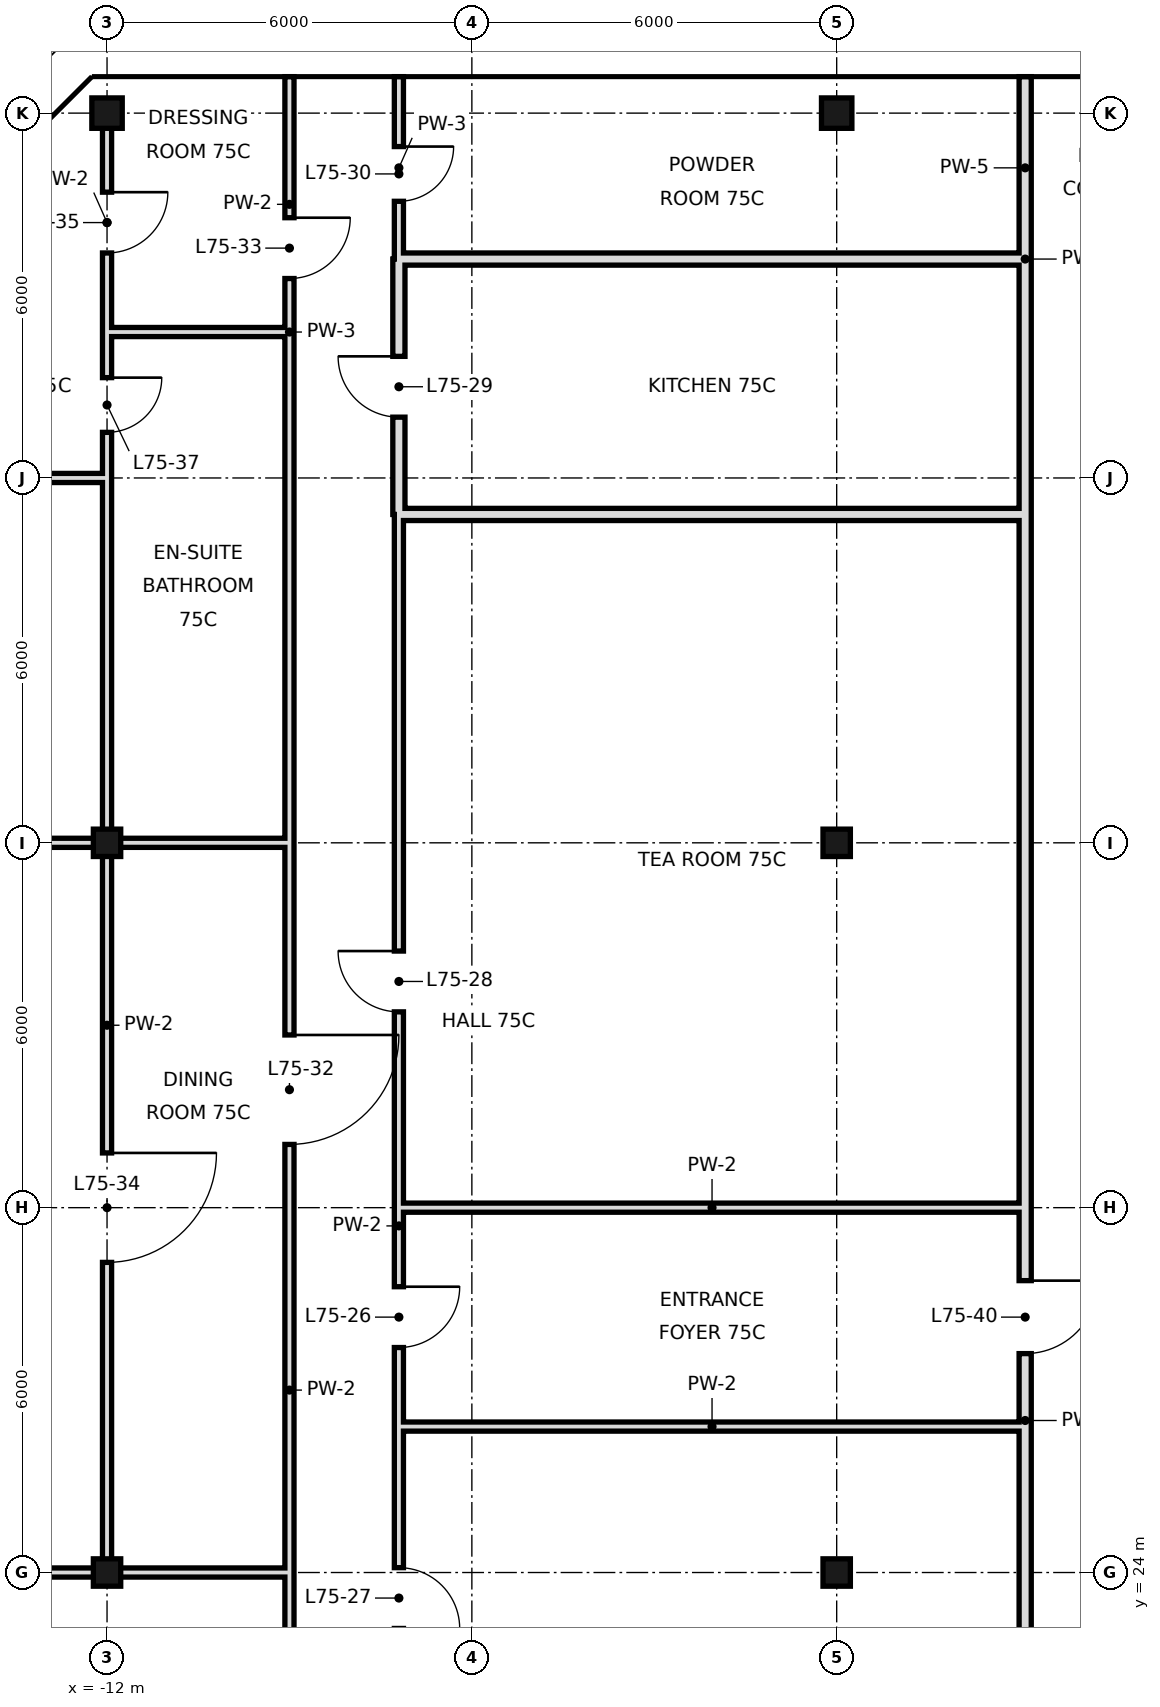
"""IFC4 building model, lengths in metres.
Left out: names, types, materials, properties, quantities, classifications, styles, units other than length and angle.
Written with IfcOpenShell. Run it as: python <this file> out.ifc"""

import sys

from ifc_helpers import new_model, si_unit, direction, frame, frame_2d, origin, origin_2d, place, context, subcontext, project, spatial, rectangle, hollow_rectangle, extrude, element, fill, save


model = new_model("IFC4")
c1 = context("Model", 3, precision=1e-05, world=origin(), true_north=direction((0.0, 1.0)))
c2 = subcontext(c1, "Body", "Model", "MODEL_VIEW")
j1 = project(units=[si_unit("LENGTHUNIT", "METRE"), si_unit("PLANEANGLEUNIT", "RADIAN")], contexts=[c1])
p1 = place(None, origin())
s1 = spatial("IfcSite", under=j1, at=p1, CompositionType="ELEMENT")
p2 = place(p1, origin())
s2 = spatial("IfcBuilding", under=s1, at=p2, CompositionType="ELEMENT")
p3 = place(p2, frame((0.0, 0.0, 316.0)))
s3 = spatial("IfcBuildingStorey", under=s2, at=p3, CompositionType="ELEMENT", Elevation=316.0)
for number, where, z_axis, x_axis in (
    (1, (-12.0, 24.0, 0.0), (0.0, 0.0, 1.0), (1.0, 0.0, 0.0)),
    (2, (-12.0, 36.0, 0.0), (0.0, 0.0, 1.0), (1.0, 0.0, 0.0)),
):
    element("IfcColumn", number, at=place(p3, frame(where, z_axis=z_axis, x_axis=x_axis)), inside=s3, PredefinedType="COLUMN", context=c2, shape_type="SweptSolid", body=[
        extrude(hollow_rectangle(XDim=0.45, YDim=0.45, WallThickness=0.022, at=origin_2d()), origin(), (0.0, 0.0, 1.0), 3.6),
    ])
p4 = place(p3, frame((-12.0, 48.0, 0.0), z_axis=(0.0, 0.0, 1.0), x_axis=(1.0, 0.0, 0.0)))
e3 = element("IfcColumn", 3, at=p4, inside=s3, PredefinedType="COLUMN", context=c2, shape_type="SweptSolid", body=[
    extrude(hollow_rectangle(XDim=0.5, YDim=0.5, WallThickness=0.025, at=origin_2d()), origin(), (0.0, 0.0, 1.0), 3.6),
])
for number, where, z_axis, x_axis in (
    (4, (0.0, 24.0, 0.0), (0.0, 0.0, 1.0), (1.0, 0.0, 0.0)),
    (5, (0.0, 36.0, 0.0), (0.0, 0.0, 1.0), (1.0, 0.0, 0.0)),
):
    element("IfcColumn", number, at=place(p3, frame(where, z_axis=z_axis, x_axis=x_axis)), inside=s3, PredefinedType="COLUMN", context=c2, shape_type="SweptSolid", body=[
        extrude(hollow_rectangle(XDim=0.45, YDim=0.45, WallThickness=0.022, at=origin_2d()), origin(), (0.0, 0.0, 1.0), 3.6),
    ])
p5 = place(p3, frame((0.0, 48.0, 0.0), z_axis=(0.0, 0.0, 1.0), x_axis=(1.0, 0.0, 0.0)))
e6 = element("IfcColumn", 6, at=p5, inside=s3, PredefinedType="COLUMN", context=c2, shape_type="SweptSolid", body=[
    extrude(hollow_rectangle(XDim=0.5, YDim=0.5, WallThickness=0.025, at=origin_2d()), origin(), (0.0, 0.0, 1.0), 3.6),
])
p6 = place(p3, frame((-12.0, 24.0, 0.0), z_axis=(0.0, 0.0, 1.0), x_axis=(0.0, 1.0, 0.0)))
e7 = element("IfcWall", 7, at=p6, inside=s3, PredefinedType="PARTITIONING", context=c2, shape_type="SweptSolid", body=[
    extrude(rectangle(XDim=12.0, YDim=0.15, at=frame_2d((6.0, 0.0))), origin(), (0.0, 0.0, 1.0), 2.72),
])
p7 = place(p6, frame((5.1, 0.0, 0.0)))
e8 = element("IfcOpeningElement", 8, at=p7, cuts=e7, PredefinedType="OPENING", context=c2, shape_type="SweptSolid", body=[
    extrude(rectangle(XDim=1.8, YDim=2.4, at=frame_2d((0.9, 1.2))), frame((0.0, 0.085, 0.0), z_axis=(0.0, -1.0, 0.0), x_axis=(1.0, 0.0, 0.0)), (0.0, 0.0, 1.0), 0.17),
])
p8 = place(p3, frame((-12.0, 44.4, 0.0), z_axis=(0.0, 0.0, 1.0), x_axis=(0.0, 1.0, 0.0)))
e9 = element("IfcWall", 9, at=p8, inside=s3, PredefinedType="PARTITIONING", context=c2, shape_type="SweptSolid", body=[
    extrude(rectangle(XDim=3.6, YDim=0.15, at=frame_2d((1.8, 0.0))), origin(), (0.0, 0.0, 1.0), 2.72),
])
p9 = place(p8, frame((1.3, 0.0, 0.0)))
e10 = element("IfcOpeningElement", 10, at=p9, cuts=e9, PredefinedType="OPENING", context=c2, shape_type="SweptSolid", body=[
    extrude(rectangle(XDim=1.0, YDim=2.4, at=frame_2d((0.5, 1.2))), frame((0.0, 0.085, 0.0), z_axis=(0.0, -1.0, 0.0), x_axis=(1.0, 0.0, 0.0)), (0.0, 0.0, 1.0), 0.17),
])
p10 = place(p3, frame((-12.0, 36.0, 0.0), z_axis=(0.0, 0.0, 1.0), x_axis=(0.0, 1.0, 0.0)))
e11 = element("IfcWall", 11, at=p10, inside=s3, PredefinedType="PARTITIONING", context=c2, shape_type="SweptSolid", body=[
    extrude(rectangle(XDim=8.4, YDim=0.15, at=frame_2d((4.2, 0.0))), origin(), (0.0, 0.0, 1.0), 2.72),
])
p11 = place(p10, frame((6.75, 0.0, 0.0)))
e12 = element("IfcOpeningElement", 12, at=p11, cuts=e11, PredefinedType="OPENING", context=c2, shape_type="SweptSolid", body=[
    extrude(rectangle(XDim=0.9, YDim=2.4, at=frame_2d((0.45, 1.2))), frame((0.0, 0.085, 0.0), z_axis=(0.0, -1.0, 0.0), x_axis=(1.0, 0.0, 0.0)), (0.0, 0.0, 1.0), 0.17),
])
p12 = place(p3, frame((-7.2, 41.4, 0.0), z_axis=(0.0, 0.0, 1.0), x_axis=(0.0, 1.0, 0.0)))
e13 = element("IfcWall", 13, at=p12, inside=s3, PredefinedType="SOLIDWALL", context=c2, shape_type="SweptSolid", body=[
    extrude(rectangle(XDim=4.2, YDim=0.2, at=frame_2d((2.1, 0.0))), origin(), (0.0, 0.0, 1.0), 2.72),
])
p13 = place(p12, frame((1.6, 0.0, 0.0)))
e14 = element("IfcOpeningElement", 14, at=p13, cuts=e13, PredefinedType="OPENING", context=c2, shape_type="SweptSolid", body=[
    extrude(rectangle(XDim=1.0, YDim=2.4, at=frame_2d((0.5, 1.2))), frame((0.0, 0.11, 0.0), z_axis=(0.0, -1.0, 0.0), x_axis=(1.0, 0.0, 0.0)), (0.0, 0.0, 1.0), 0.22),
])
p14 = place(p3, frame((-7.2, 18.0, 0.0), z_axis=(0.0, 0.0, 1.0), x_axis=(0.0, 1.0, 0.0)))
e15 = element("IfcWall", 15, at=p14, inside=s3, PredefinedType="PARTITIONING", context=c2, shape_type="SweptSolid", body=[
    extrude(rectangle(XDim=23.4, YDim=0.15, at=frame_2d((11.7, 0.0))), origin(), (0.0, 0.0, 1.0), 3.42),
])
p15 = place(p14, frame((9.7, 0.0, 0.0)))
e16 = element("IfcOpeningElement", 16, at=p15, cuts=e15, PredefinedType="OPENING", context=c2, shape_type="SweptSolid", body=[
    extrude(rectangle(XDim=1.0, YDim=2.4, at=frame_2d((0.5, 1.2))), frame((0.0, 0.085, 0.0), z_axis=(0.0, -1.0, 0.0), x_axis=(1.0, 0.0, 0.0)), (0.0, 0.0, 1.0), 0.17),
])
p16 = place(p14, frame((5.08, 0.0, 0.0)))
e17 = element("IfcOpeningElement", 17, at=p16, cuts=e15, PredefinedType="OPENING", context=c2, shape_type="SweptSolid", body=[
    extrude(rectangle(XDim=1.0, YDim=2.4, at=frame_2d((0.5, 1.2))), frame((0.0, 0.085, 0.0), z_axis=(0.0, -1.0, 0.0), x_axis=(1.0, 0.0, 0.0)), (0.0, 0.0, 1.0), 0.17),
])
p17 = place(p14, frame((15.22, 0.0, 0.0)))
e18 = element("IfcOpeningElement", 18, at=p17, cuts=e15, PredefinedType="OPENING", context=c2, shape_type="SweptSolid", body=[
    extrude(rectangle(XDim=1.0, YDim=2.4, at=frame_2d((0.5, 1.2))), frame((0.0, 0.085, 0.0), z_axis=(0.0, -1.0, 0.0), x_axis=(1.0, 0.0, 0.0)), (0.0, 0.0, 1.0), 0.17),
])
p18 = place(p3, frame((-7.2, 45.6, 0.0), z_axis=(0.0, 0.0, 1.0), x_axis=(0.0, 1.0, 0.0)))
e19 = element("IfcWall", 19, at=p18, inside=s3, PredefinedType="PARTITIONING", context=c2, shape_type="SweptSolid", body=[
    extrude(rectangle(XDim=3.0, YDim=0.15, at=frame_2d((1.5, 0.0))), origin(), (0.0, 0.0, 1.0), 3.42),
])
p19 = place(p18, frame((0.95, 0.0, 0.0)))
e20 = element("IfcOpeningElement", 20, at=p19, cuts=e19, PredefinedType="OPENING", context=c2, shape_type="SweptSolid", body=[
    extrude(rectangle(XDim=0.9, YDim=2.4, at=frame_2d((0.45, 1.2))), frame((0.0, 0.085, 0.0), z_axis=(0.0, -1.0, 0.0), x_axis=(1.0, 0.0, 0.0)), (0.0, 0.0, 1.0), 0.17),
])
p20 = place(p3, frame((-9.0, 18.0, 0.0), z_axis=(0.0, 0.0, 1.0), x_axis=(0.0, 1.0, 0.0)))
e21 = element("IfcWall", 21, at=p20, inside=s3, PredefinedType="PARTITIONING", context=c2, shape_type="SweptSolid", body=[
    extrude(rectangle(XDim=18.0, YDim=0.15, at=frame_2d((9.0, 0.0))), origin(), (0.0, 0.0, 1.0), 3.42),
])
p21 = place(p20, frame((2.5, 0.0, 0.0)))
e22 = element("IfcOpeningElement", 22, at=p21, cuts=e21, PredefinedType="OPENING", context=c2, shape_type="SweptSolid", body=[
    extrude(rectangle(XDim=1.0, YDim=2.4, at=frame_2d((0.5, 1.2))), frame((0.0, 0.085, 0.0), z_axis=(0.0, -1.0, 0.0), x_axis=(1.0, 0.0, 0.0)), (0.0, 0.0, 1.0), 0.17),
])
p22 = place(p20, frame((13.04, 0.0, 0.0)))
e23 = element("IfcOpeningElement", 23, at=p22, cuts=e21, PredefinedType="OPENING", context=c2, shape_type="SweptSolid", body=[
    extrude(rectangle(XDim=1.8, YDim=2.4, at=frame_2d((0.9, 1.2))), frame((0.0, 0.085, 0.0), z_axis=(0.0, -1.0, 0.0), x_axis=(1.0, 0.0, 0.0)), (0.0, 0.0, 1.0), 0.17),
])
p23 = place(p3, frame((-9.0, 44.4, 0.0), z_axis=(0.0, 0.0, 1.0), x_axis=(0.0, 1.0, 0.0)))
e24 = element("IfcWall", 24, at=p23, inside=s3, PredefinedType="PARTITIONING", context=c2, shape_type="SweptSolid", body=[
    extrude(rectangle(XDim=4.2, YDim=0.15, at=frame_2d((2.1, 0.0))), origin(), (0.0, 0.0, 1.0), 3.42),
])
p24 = place(p23, frame((0.88, 0.0, 0.0)))
e25 = element("IfcOpeningElement", 25, at=p24, cuts=e24, PredefinedType="OPENING", context=c2, shape_type="SweptSolid", body=[
    extrude(rectangle(XDim=1.0, YDim=2.4, at=frame_2d((0.5, 1.2))), frame((0.0, 0.085, 0.0), z_axis=(0.0, -1.0, 0.0), x_axis=(1.0, 0.0, 0.0)), (0.0, 0.0, 1.0), 0.17),
])
p25 = place(p3, frame((-9.0, 36.0, 0.0), z_axis=(0.0, 0.0, 1.0), x_axis=(0.0, 1.0, 0.0)))
e26 = element("IfcWall", 26, at=p25, inside=s3, PredefinedType="PARTITIONING", context=c2, shape_type="SweptSolid", body=[
    extrude(rectangle(XDim=8.4, YDim=0.15, at=frame_2d((4.2, 0.0))), origin(), (0.0, 0.0, 1.0), 3.42),
])
p26 = place(p3, frame((3.1, 18.7, 0.0), z_axis=(0.0, 0.0, 1.0), x_axis=(0.0, 1.0, 0.0)))
e27 = element("IfcWall", 27, at=p26, inside=s3, PredefinedType="SOLIDWALL", context=c2, shape_type="SweptSolid", body=[
    extrude(rectangle(XDim=22.7, YDim=0.2, at=frame_2d((11.35, 0.0))), origin(), (0.0, 0.0, 1.0), 2.97),
])
p27 = place(p26, frame((8.9, 0.0, 0.0)))
e28 = element("IfcOpeningElement", 28, at=p27, cuts=e27, PredefinedType="OPENING", context=c2, shape_type="SweptSolid", body=[
    extrude(rectangle(XDim=1.2, YDim=2.4, at=frame_2d((0.6, 1.2))), frame((0.0, 0.11, 0.0), z_axis=(0.0, -1.0, 0.0), x_axis=(1.0, 0.0, 0.0)), (0.0, 0.0, 1.0), 0.22),
])
p28 = place(p3, frame((3.1, 45.6, 0.0), z_axis=(0.0, 0.0, 1.0), x_axis=(0.0, 1.0, 0.0)))
e29 = element("IfcWall", 29, at=p28, inside=s3, PredefinedType="SOLIDWALL", context=c2, shape_type="SweptSolid", body=[
    extrude(rectangle(XDim=3.0, YDim=0.2, at=frame_2d((1.5, 0.0))), origin(), (0.0, 0.0, 1.0), 2.72),
])
p29 = place(p3, frame((3.1, 41.4, 0.0), z_axis=(0.0, 0.0, 1.0), x_axis=(0.0, 1.0, 0.0)))
e30 = element("IfcWall", 30, at=p29, inside=s3, PredefinedType="SOLIDWALL", context=c2, shape_type="SweptSolid", body=[
    extrude(rectangle(XDim=4.2, YDim=0.2, at=frame_2d((2.1, 0.0))), origin(), (0.0, 0.0, 1.0), 2.97),
])
p30 = place(p3, frame((-18.0, 24.0, 0.0), z_axis=(0.0, 0.0, 1.0), x_axis=(1.0, 0.0, 0.0)))
e31 = element("IfcWall", 31, at=p30, inside=s3, PredefinedType="PARTITIONING", context=c2, shape_type="SweptSolid", body=[
    extrude(rectangle(XDim=9.0, YDim=0.15, at=frame_2d((4.5, 0.0))), origin(), (0.0, 0.0, 1.0), 2.72),
])
p31 = place(p3, frame((-7.2, 26.4, 0.0), z_axis=(0.0, 0.0, 1.0), x_axis=(1.0, 0.0, 0.0)))
e32 = element("IfcWall", 32, at=p31, inside=s3, PredefinedType="PARTITIONING", context=c2, shape_type="SweptSolid", body=[
    extrude(rectangle(XDim=10.3, YDim=0.15, at=frame_2d((5.15, 0.0))), origin(), (0.0, 0.0, 1.0), 3.42),
])
p32 = place(p3, frame((-7.2, 30.0, 0.0), z_axis=(0.0, 0.0, 1.0), x_axis=(1.0, 0.0, 0.0)))
e33 = element("IfcWall", 33, at=p32, inside=s3, PredefinedType="PARTITIONING", context=c2, shape_type="SweptSolid", body=[
    extrude(rectangle(XDim=10.3, YDim=0.15, at=frame_2d((5.15, 0.0))), origin(), (0.0, 0.0, 1.0), 2.72),
])
p33 = place(p3, frame((-18.0, 36.0, 0.0), z_axis=(0.0, 0.0, 1.0), x_axis=(1.0, 0.0, 0.0)))
e34 = element("IfcWall", 34, at=p33, inside=s3, PredefinedType="PARTITIONING", context=c2, shape_type="SweptSolid", body=[
    extrude(rectangle(XDim=6.0, YDim=0.15, at=frame_2d((3.0, 0.0))), origin(), (0.0, 0.0, 1.0), 2.97),
])
p34 = place(p3, frame((-12.0, 36.0, 0.0), z_axis=(0.0, 0.0, 1.0), x_axis=(1.0, 0.0, 0.0)))
e35 = element("IfcWall", 35, at=p34, inside=s3, PredefinedType="PARTITIONING", context=c2, shape_type="SweptSolid", body=[
    extrude(rectangle(XDim=3.0, YDim=0.15, at=frame_2d((1.5, 0.0))), origin(), (0.0, 0.0, 1.0), 2.72),
])
p35 = place(p3, frame((-7.2, 41.4, 0.0), z_axis=(0.0, 0.0, 1.0), x_axis=(1.0, 0.0, 0.0)))
e36 = element("IfcWall", 36, at=p35, inside=s3, PredefinedType="SOLIDWALL", context=c2, shape_type="SweptSolid", body=[
    extrude(rectangle(XDim=10.3, YDim=0.2, at=frame_2d((5.15, 0.0))), origin(), (0.0, 0.0, 1.0), 2.72),
])
p36 = place(p3, frame((-18.0, 42.0, 0.0), z_axis=(0.0, 0.0, 1.0), x_axis=(1.0, 0.0, 0.0)))
e37 = element("IfcWall", 37, at=p36, inside=s3, PredefinedType="PARTITIONING", context=c2, shape_type="SweptSolid", body=[
    extrude(rectangle(XDim=6.0, YDim=0.15, at=frame_2d((3.0, 0.0))), origin(), (0.0, 0.0, 1.0), 2.97),
])
p37 = place(p36, frame((2.5, 0.0, 0.0)))
e38 = element("IfcOpeningElement", 38, at=p37, cuts=e37, PredefinedType="OPENING", context=c2, shape_type="SweptSolid", body=[
    extrude(rectangle(XDim=1.0, YDim=2.4, at=frame_2d((0.5, 1.2))), frame((0.0, 0.085, 0.0), z_axis=(0.0, -1.0, 0.0), x_axis=(1.0, 0.0, 0.0)), (0.0, 0.0, 1.0), 0.17),
])
p38 = place(p3, frame((-12.0, 44.4, 0.0), z_axis=(0.0, 0.0, 1.0), x_axis=(1.0, 0.0, 0.0)))
e39 = element("IfcWall", 39, at=p38, inside=s3, PredefinedType="PARTITIONING", context=c2, shape_type="SweptSolid", body=[
    extrude(rectangle(XDim=3.0, YDim=0.15, at=frame_2d((1.5, 0.0))), origin(), (0.0, 0.0, 1.0), 3.42),
])
p39 = place(p3, frame((-7.2, 45.6, 0.0), z_axis=(0.0, 0.0, 1.0), x_axis=(1.0, 0.0, 0.0)))
e40 = element("IfcWall", 40, at=p39, inside=s3, PredefinedType="SOLIDWALL", context=c2, shape_type="SweptSolid", body=[
    extrude(rectangle(XDim=10.3, YDim=0.2, at=frame_2d((5.15, 0.0))), origin(), (0.0, 0.0, 1.0), 2.72),
])
p40 = place(p15, origin())
e41 = element("IfcDoor", 41, at=p40, inside=s3, OperationType="SINGLE_SWING_RIGHT", PredefinedType="DOOR", context=c2, shape_type="SweptSolid", body=[
    extrude(rectangle(XDim=1.0, YDim=2.4, at=frame_2d((0.5, 1.2))), frame((0.0, 0.025, 0.0), z_axis=(0.0, -1.0, 0.0), x_axis=(1.0, 0.0, 0.0)), (0.0, 0.0, 1.0), 0.05),
])
fill(e16, e41)
p41 = place(p16, frame((1.0, 0.0, 0.0), z_axis=(0.0, 0.0, 1.0), x_axis=(-1.0, 0.0, 0.0)))
e42 = element("IfcDoor", 42, at=p41, inside=s3, OperationType="SINGLE_SWING_RIGHT", PredefinedType="DOOR", context=c2, shape_type="SweptSolid", body=[
    extrude(rectangle(XDim=1.0, YDim=2.4, at=frame_2d((0.5, 1.2))), frame((0.0, 0.025, 0.0), z_axis=(0.0, -1.0, 0.0), x_axis=(1.0, 0.0, 0.0)), (0.0, 0.0, 1.0), 0.05),
])
fill(e17, e42)
p42 = place(p17, frame((1.0, 0.0, 0.0), z_axis=(0.0, 0.0, 1.0), x_axis=(-1.0, 0.0, 0.0)))
e43 = element("IfcDoor", 43, at=p42, inside=s3, OperationType="SINGLE_SWING_LEFT", PredefinedType="DOOR", context=c2, shape_type="SweptSolid", body=[
    extrude(rectangle(XDim=1.0, YDim=2.4, at=frame_2d((0.5, 1.2))), frame((0.0, 0.025, 0.0), z_axis=(0.0, -1.0, 0.0), x_axis=(1.0, 0.0, 0.0)), (0.0, 0.0, 1.0), 0.05),
])
fill(e18, e43)
p43 = place(p13, frame((1.0, 0.0, 0.0), z_axis=(0.0, 0.0, 1.0), x_axis=(-1.0, 0.0, 0.0)))
e44 = element("IfcDoor", 44, at=p43, inside=s3, OperationType="SINGLE_SWING_LEFT", PredefinedType="DOOR", context=c2, shape_type="SweptSolid", body=[
    extrude(rectangle(XDim=1.0, YDim=2.4, at=frame_2d((0.5, 1.2))), frame((0.0, 0.025, 0.0), z_axis=(0.0, -1.0, 0.0), x_axis=(1.0, 0.0, 0.0)), (0.0, 0.0, 1.0), 0.05),
])
fill(e14, e44)
p44 = place(p19, origin())
e45 = element("IfcDoor", 45, at=p44, inside=s3, OperationType="SINGLE_SWING_RIGHT", PredefinedType="DOOR", context=c2, shape_type="SweptSolid", body=[
    extrude(rectangle(XDim=0.9, YDim=2.4, at=frame_2d((0.45, 1.2))), frame((0.0, 0.025, 0.0), z_axis=(0.0, -1.0, 0.0), x_axis=(1.0, 0.0, 0.0)), (0.0, 0.0, 1.0), 0.05),
])
fill(e20, e45)
p45 = place(p22, origin())
e46 = element("IfcDoor", 46, at=p45, inside=s3, OperationType="SINGLE_SWING_RIGHT", PredefinedType="DOOR", context=c2, shape_type="SweptSolid", body=[
    extrude(rectangle(XDim=1.8, YDim=2.4, at=frame_2d((0.9, 1.2))), frame((0.0, 0.025, 0.0), z_axis=(0.0, -1.0, 0.0), x_axis=(1.0, 0.0, 0.0)), (0.0, 0.0, 1.0), 0.05),
])
fill(e23, e46)
p46 = place(p24, origin())
e47 = element("IfcDoor", 47, at=p46, inside=s3, OperationType="SINGLE_SWING_RIGHT", PredefinedType="DOOR", context=c2, shape_type="SweptSolid", body=[
    extrude(rectangle(XDim=1.0, YDim=2.4, at=frame_2d((0.5, 1.2))), frame((0.0, 0.025, 0.0), z_axis=(0.0, -1.0, 0.0), x_axis=(1.0, 0.0, 0.0)), (0.0, 0.0, 1.0), 0.05),
])
fill(e25, e47)
p47 = place(p7, origin())
e48 = element("IfcDoor", 48, at=p47, inside=s3, OperationType="SINGLE_SWING_RIGHT", PredefinedType="DOOR", context=c2, shape_type="SweptSolid", body=[
    extrude(rectangle(XDim=1.8, YDim=2.4, at=frame_2d((0.9, 1.2))), frame((0.0, 0.025, 0.0), z_axis=(0.0, -1.0, 0.0), x_axis=(1.0, 0.0, 0.0)), (0.0, 0.0, 1.0), 0.05),
])
fill(e8, e48)
p48 = place(p9, origin())
e49 = element("IfcDoor", 49, at=p48, inside=s3, OperationType="SINGLE_SWING_RIGHT", PredefinedType="DOOR", context=c2, shape_type="SweptSolid", body=[
    extrude(rectangle(XDim=1.0, YDim=2.4, at=frame_2d((0.5, 1.2))), frame((0.0, 0.025, 0.0), z_axis=(0.0, -1.0, 0.0), x_axis=(1.0, 0.0, 0.0)), (0.0, 0.0, 1.0), 0.05),
])
fill(e10, e49)
p49 = place(p11, origin())
e50 = element("IfcDoor", 50, at=p49, inside=s3, OperationType="SINGLE_SWING_RIGHT", PredefinedType="DOOR", context=c2, shape_type="SweptSolid", body=[
    extrude(rectangle(XDim=0.9, YDim=2.4, at=frame_2d((0.45, 1.2))), frame((0.0, 0.025, 0.0), z_axis=(0.0, -1.0, 0.0), x_axis=(1.0, 0.0, 0.0)), (0.0, 0.0, 1.0), 0.05),
])
fill(e12, e50)
p50 = place(p27, origin())
e51 = element("IfcDoor", 51, at=p50, inside=s3, OperationType="SINGLE_SWING_RIGHT", PredefinedType="DOOR", context=c2, shape_type="SweptSolid", body=[
    extrude(rectangle(XDim=1.2, YDim=2.4, at=frame_2d((0.6, 1.2))), frame((0.0, 0.025, 0.0), z_axis=(0.0, -1.0, 0.0), x_axis=(1.0, 0.0, 0.0)), (0.0, 0.0, 1.0), 0.05),
])
fill(e28, e51)
save(model, sys.argv[1])
